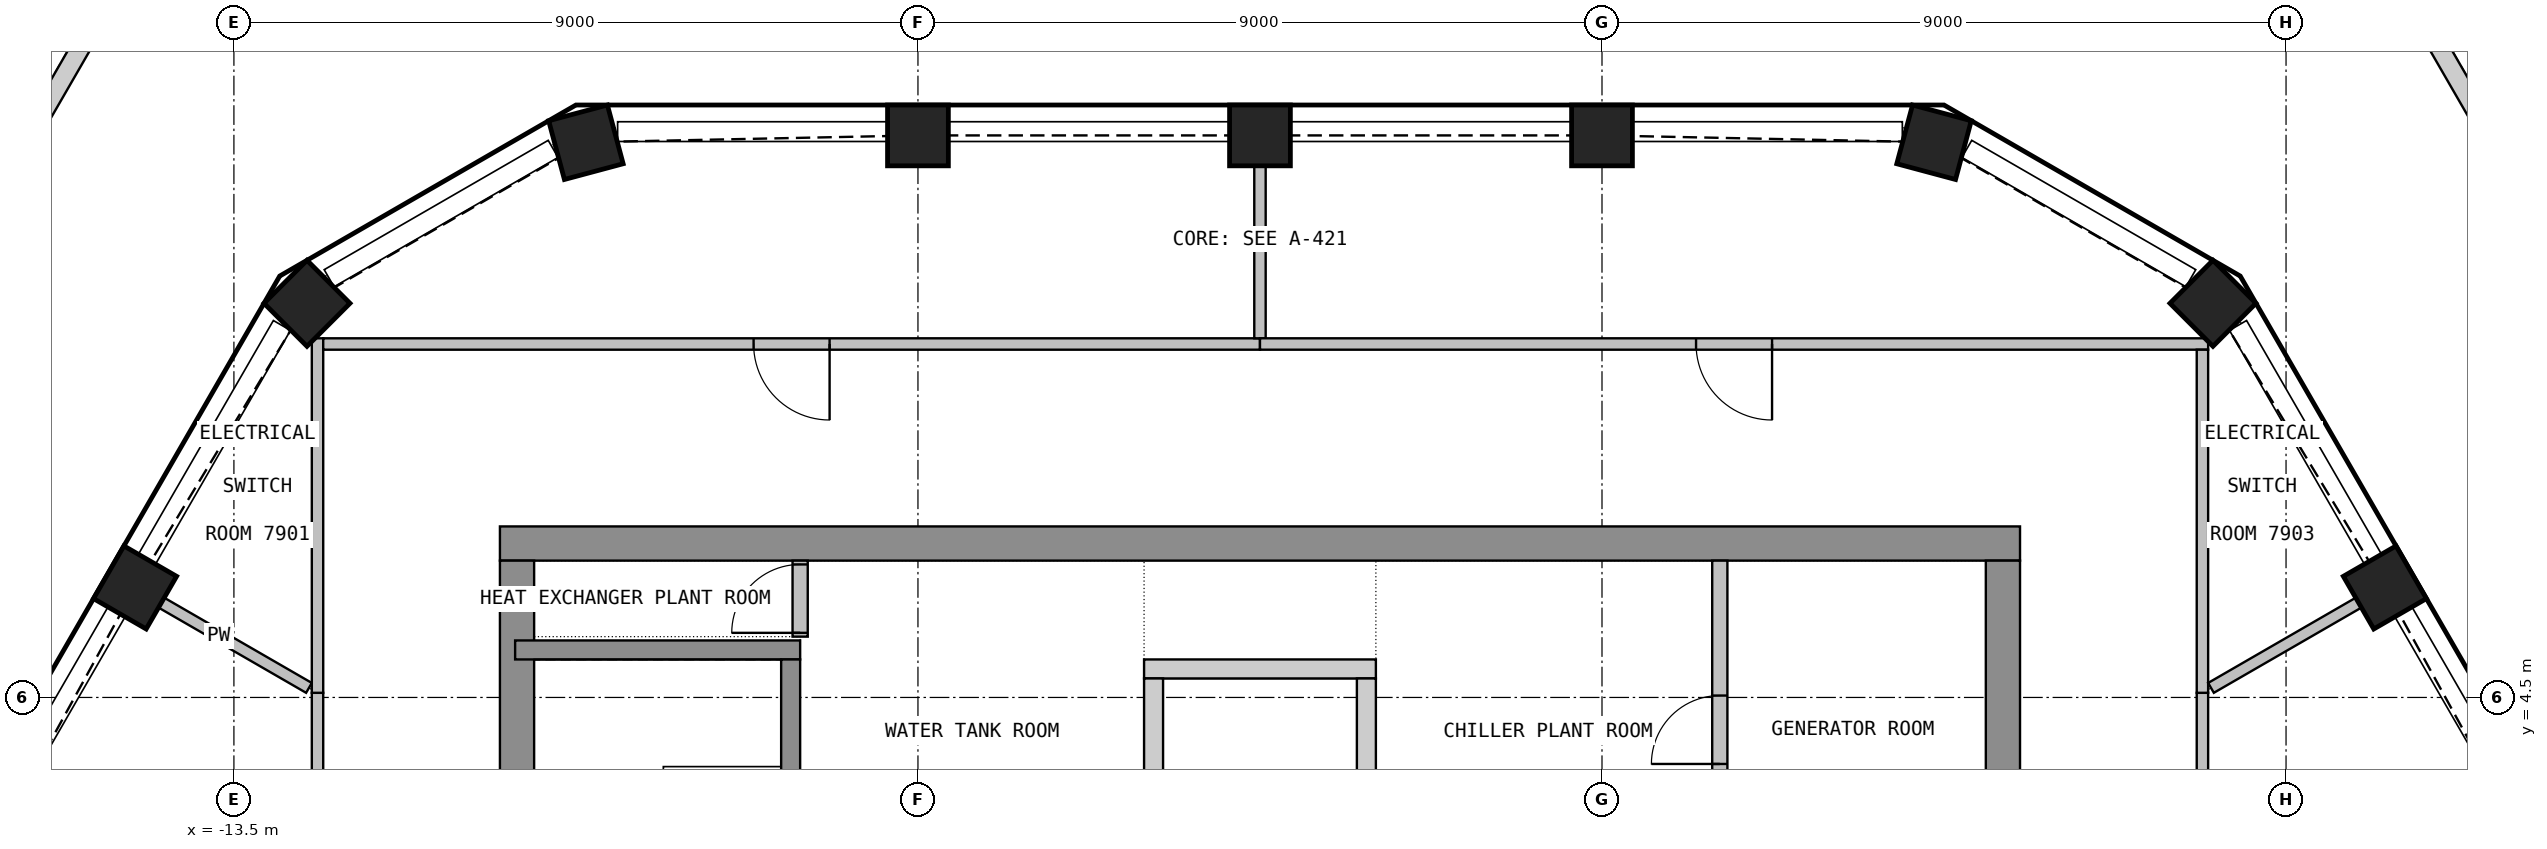
"""IFC4 building model, lengths in metres.
Left out: names, types, materials, properties, quantities, classifications, styles, units other than length and angle.
Written with IfcOpenShell. Run it as: python <this file> out.ifc"""

import sys

from ifc_helpers import new_model, si_unit, direction, frame, frame_2d, origin, origin_2d, place, context, subcontext, project, spatial, polyline, rectangle, outline, extrude, element, fill, save


model = new_model("IFC4")
c1 = context("Model", 3, precision=1e-05, world=origin(), true_north=direction((0.0, 1.0)))
c2 = subcontext(c1, "Body", "Model", "MODEL_VIEW")
j1 = project(units=[si_unit("LENGTHUNIT", "METRE"), si_unit("PLANEANGLEUNIT", "RADIAN")], contexts=[c1])
p1 = place(None, origin())
s1 = spatial("IfcSite", under=j1, at=p1, CompositionType="ELEMENT")
p2 = place(p1, origin())
s2 = spatial("IfcBuilding", under=s1, at=p2, CompositionType="ELEMENT")
p3 = place(p2, frame((0.0, 0.0, 323.4)))
s3 = spatial("IfcBuildingStorey", under=s2, at=p3, CompositionType="ELEMENT", Elevation=323.4)
for number, where, z_axis, x_axis in (
    (1, (14.801, 5.947, 0.0), (0.0, 0.0, 1.0), (-0.5, 0.866, 0.0)),
    (2, (12.539, 9.686, 0.0), (0.0, 0.0, 1.0), (-0.707, 0.707, 0.0)),
    (3, (8.869, 11.804, 0.0), (0.0, 0.0, 1.0), (-0.966, 0.259, 0.0)),
    (4, (4.5, 11.894, 0.0), (0.0, 0.0, 1.0), (-1.0, 0.0, 0.0)),
    (5, (0.0, 11.894, 0.0), (0.0, 0.0, 1.0), (-1.0, 0.0, 0.0)),
    (6, (-4.5, 11.894, 0.0), (0.0, 0.0, 1.0), (-1.0, 0.0, 0.0)),
    (7, (-8.869, 11.804, 0.0), (0.0, 0.0, 1.0), (-0.966, -0.259, 0.0)),
    (8, (-12.539, 9.686, 0.0), (0.0, 0.0, 1.0), (-0.707, -0.707, 0.0)),
    (9, (-14.801, 5.947, 0.0), (0.0, 0.0, 1.0), (-0.5, -0.866, 0.0)),
):
    element("IfcColumn", number, at=place(p3, frame(where, z_axis=z_axis, x_axis=x_axis)), inside=s3, PredefinedType="COLUMN", context=c2, shape_type="SweptSolid", body=[
        extrude(rectangle(XDim=0.8, YDim=0.8, at=origin_2d()), origin(), (0.0, 0.0, 1.0), 4.05),
    ])
p4 = place(p3, origin())
e10 = element("IfcWall", 10, at=p4, inside=s3, PredefinedType="PARAPET", context=c2, shape_type="SweptSolid", body=[
    extrude(outline(polyline([(17.397, 10.044), (15.147, 13.941), (14.964, 13.758), (17.181, 9.919), (17.397, 10.044)])), origin(), (0.0, 0.0, 1.0), 1.1),
])
p5 = place(p3, origin())
e11 = element("IfcWall", 11, at=p5, inside=s3, PredefinedType="PARAPET", context=c2, shape_type="SweptSolid", body=[
    extrude(outline(polyline([(-15.147, 13.941), (-17.397, 10.044), (-17.181, 9.919), (-14.964, 13.758), (-15.147, 13.941)])), origin(), (0.0, 0.0, 1.0), 1.1),
])
p6 = place(p3, frame((-10.0, 6.525, 0.0), z_axis=(0.0, 0.0, 1.0), x_axis=(1.0, 0.0, 0.0)))
e12 = element("IfcWall", 12, at=p6, inside=s3, PredefinedType="SHEAR", context=c2, shape_type="SweptSolid", body=[
    extrude(rectangle(XDim=20.0, YDim=0.45, at=frame_2d((10.0, 0.0))), origin(), (0.0, 0.0, 1.0), 4.05),
])
p7 = place(p3, frame((-9.775, -6.3, 0.0), z_axis=(0.0, 0.0, 1.0), x_axis=(0.0, 1.0, 0.0)))
e13 = element("IfcWall", 13, at=p7, inside=s3, PredefinedType="SHEAR", context=c2, shape_type="SweptSolid", body=[
    extrude(rectangle(XDim=12.6, YDim=0.45, at=frame_2d((6.3, 0.0))), origin(), (0.0, 0.0, 1.0), 4.05),
])
p8 = place(p7, frame((4.8, 0.0, 0.0)))
e14 = element("IfcOpeningElement", 14, at=p8, cuts=e13, PredefinedType="OPENING", context=c2, shape_type="SweptSolid", body=[
    extrude(rectangle(XDim=1.2, YDim=2.1, at=frame_2d((0.6, 1.05))), frame((0.0, 0.235, 0.0), z_axis=(0.0, -1.0, 0.0), x_axis=(1.0, 0.0, 0.0)), (0.0, 0.0, 1.0), 0.47),
])
p9 = place(p3, frame((9.775, -6.3, 0.0), z_axis=(0.0, 0.0, 1.0), x_axis=(0.0, 1.0, 0.0)))
e15 = element("IfcWall", 15, at=p9, inside=s3, PredefinedType="SHEAR", context=c2, shape_type="SweptSolid", body=[
    extrude(rectangle(XDim=12.6, YDim=0.45, at=frame_2d((6.3, 0.0))), origin(), (0.0, 0.0, 1.0), 4.05),
])
p10 = place(p9, frame((6.6, 0.0, 0.0)))
e16 = element("IfcOpeningElement", 16, at=p10, cuts=e15, PredefinedType="OPENING", context=c2, shape_type="SweptSolid", body=[
    extrude(rectangle(XDim=1.2, YDim=2.1, at=frame_2d((0.6, 1.05))), frame((0.0, 0.235, 0.0), z_axis=(0.0, -1.0, 0.0), x_axis=(1.0, 0.0, 0.0)), (0.0, 0.0, 1.0), 0.47),
])
p11 = place(p3, origin())
e17 = element("IfcWall", 17, at=p11, inside=s3, PredefinedType="SHEAR", context=c2, shape_type="SweptSolid", body=[
    extrude(outline(polyline([(-1.525, 4.75), (1.525, 4.75), (1.525, 5.0), (-1.525, 5.0), (-1.525, 4.75)])), origin(), (0.0, 0.0, 1.0), 4.05),
])
p12 = place(p3, origin())
e18 = element("IfcWall", 18, at=p12, inside=s3, PredefinedType="SHEAR", context=c2, shape_type="SweptSolid", body=[
    extrude(outline(polyline([(-1.525, 2.05), (-1.275, 2.05), (-1.275, 4.75), (-1.525, 4.75), (-1.525, 2.05)])), origin(), (0.0, 0.0, 1.0), 4.05),
])
p13 = place(p3, origin())
e19 = element("IfcWall", 19, at=p13, inside=s3, PredefinedType="SHEAR", context=c2, shape_type="SweptSolid", body=[
    extrude(outline(polyline([(1.275, 2.05), (1.525, 2.05), (1.525, 4.75), (1.275, 4.75), (1.275, 2.05)])), origin(), (0.0, 0.0, 1.0), 4.05),
])
p14 = place(p3, frame((-9.8, 5.125, 0.0), z_axis=(0.0, 0.0, 1.0), x_axis=(1.0, 0.0, 0.0)))
e20 = element("IfcWall", 20, at=p14, inside=s3, PredefinedType="SHEAR", context=c2, shape_type="SweptSolid", body=[
    extrude(rectangle(XDim=3.75, YDim=0.25, at=frame_2d((1.875, 0.0))), origin(), (0.0, 0.0, 1.0), 4.05),
])
p15 = place(p3, frame((-6.175, -1.6, 0.0), z_axis=(0.0, 0.0, 1.0), x_axis=(0.0, 1.0, 0.0)))
e21 = element("IfcWall", 21, at=p15, inside=s3, PredefinedType="SHEAR", context=c2, shape_type="SweptSolid", body=[
    extrude(rectangle(XDim=6.6, YDim=0.25, at=frame_2d((3.3, 0.0))), origin(), (0.0, 0.0, 1.0), 4.05),
])
p16 = place(p15, frame((0.2, 0.0, 0.0)))
e22 = element("IfcOpeningElement", 22, at=p16, cuts=e21, PredefinedType="OPENING", context=c2, shape_type="SweptSolid", body=[
    extrude(rectangle(XDim=1.2, YDim=2.1, at=frame_2d((0.6, 1.05))), frame((0.0, 0.135, 0.0), z_axis=(0.0, -1.0, 0.0), x_axis=(1.0, 0.0, 0.0)), (0.0, 0.0, 1.0), 0.27),
])
p17 = place(p3, frame((-6.05, 5.3, 0.0), z_axis=(0.0, 0.0, 1.0), x_axis=(0.0, 1.0, 0.0)))
e23 = element("IfcWall", 23, at=p17, inside=s3, PredefinedType="PARTITIONING", context=c2, shape_type="SweptSolid", body=[
    extrude(rectangle(XDim=1.0, YDim=0.2, at=frame_2d((0.5, 0.0))), origin(), (0.0, 0.0, 1.0), 4.05),
])
p18 = place(p17, frame((0.05, 0.0, 0.0)))
e24 = element("IfcOpeningElement", 24, at=p18, cuts=e23, PredefinedType="OPENING", context=c2, shape_type="SweptSolid", body=[
    extrude(rectangle(XDim=0.9, YDim=2.1, at=frame_2d((0.45, 1.05))), frame((0.0, 0.11, 0.0), z_axis=(0.0, -1.0, 0.0), x_axis=(1.0, 0.0, 0.0)), (0.0, 0.0, 1.0), 0.22),
])
p19 = place(p3, frame((6.05, 1.85, 0.0), z_axis=(0.0, 0.0, 1.0), x_axis=(0.0, 1.0, 0.0)))
e25 = element("IfcWall", 25, at=p19, inside=s3, PredefinedType="PARTITIONING", context=c2, shape_type="SweptSolid", body=[
    extrude(rectangle(XDim=4.45, YDim=0.2, at=frame_2d((2.225, 0.0))), origin(), (0.0, 0.0, 1.0), 4.05),
])
p20 = place(p19, frame((1.775, 0.0, 0.0)))
e26 = element("IfcOpeningElement", 26, at=p20, cuts=e25, PredefinedType="OPENING", context=c2, shape_type="SweptSolid", body=[
    extrude(rectangle(XDim=0.9, YDim=2.1, at=frame_2d((0.45, 1.05))), frame((0.0, 0.11, 0.0), z_axis=(0.0, -1.0, 0.0), x_axis=(1.0, 0.0, 0.0)), (0.0, 0.0, 1.0), 0.22),
])
p21 = place(p3, frame((-14.887, 5.997, 0.0), z_axis=(0.0, 0.0, 1.0), x_axis=(0.865976483427, -0.500084722974, 0.0)))
e27 = element("IfcWall", 27, at=p21, inside=s3, PredefinedType="PARTITIONING", context=c2, shape_type="SweptSolid", body=[
    extrude(rectangle(XDim=2.742, YDim=0.15, at=frame_2d((1.371, 0.0))), origin(), (0.0, 0.0, 1.0), 4.05),
])
p22 = place(p3, frame((-12.4, 4.561, 0.0), z_axis=(0.0, 0.0, 1.0), x_axis=(0.0, -1.0, 0.0)))
e28 = element("IfcWall", 28, at=p22, inside=s3, PredefinedType="PARTITIONING", context=c2, shape_type="SweptSolid", body=[
    extrude(rectangle(XDim=13.786, YDim=0.15, at=frame_2d((6.893, 0.0))), origin(), (0.0, 0.0, 1.0), 4.05),
])
p23 = place(p22, frame((6.393, 0.0, 0.0)))
e29 = element("IfcOpeningElement", 29, at=p23, cuts=e28, PredefinedType="OPENING", context=c2, shape_type="SweptSolid", body=[
    extrude(rectangle(XDim=1.0, YDim=2.1, at=frame_2d((0.5, 1.05))), frame((0.0, 0.085, 0.0), z_axis=(0.0, -1.0, 0.0), x_axis=(1.0, 0.0, 0.0)), (0.0, 0.0, 1.0), 0.17),
])
p24 = place(p3, frame((-12.4, 9.225, 0.0), z_axis=(0.0, 0.0, 1.0), x_axis=(0.0, -1.0, 0.0)))
e30 = element("IfcWall", 30, at=p24, inside=s3, PredefinedType="PARTITIONING", context=c2, shape_type="SweptSolid", body=[
    extrude(rectangle(XDim=4.664, YDim=0.15, at=frame_2d((2.332, 0.0))), origin(), (0.0, 0.0, 1.0), 4.05),
])
p25 = place(p3, frame((0.0, 9.15, 0.0), z_axis=(0.0, 0.0, 1.0), x_axis=(-1.0, 0.0, 0.0)))
e31 = element("IfcWall", 31, at=p25, inside=s3, PredefinedType="PARTITIONING", context=c2, shape_type="SweptSolid", body=[
    extrude(rectangle(XDim=12.325, YDim=0.15, at=frame_2d((6.163, 0.0))), origin(), (0.0, 0.0, 1.0), 4.05),
])
p26 = place(p25, frame((5.663, 0.0, 0.0)))
e32 = element("IfcOpeningElement", 32, at=p26, cuts=e31, PredefinedType="OPENING", context=c2, shape_type="SweptSolid", body=[
    extrude(rectangle(XDim=1.0, YDim=2.1, at=frame_2d((0.5, 1.05))), frame((0.0, 0.085, 0.0), z_axis=(0.0, -1.0, 0.0), x_axis=(1.0, 0.0, 0.0)), (0.0, 0.0, 1.0), 0.17),
])
p27 = place(p3, frame((0.0, 11.994, 0.0), z_axis=(0.0, 0.0, 1.0), x_axis=(0.0, -1.0, 0.0)))
e33 = element("IfcWall", 33, at=p27, inside=s3, PredefinedType="PARTITIONING", context=c2, shape_type="SweptSolid", body=[
    extrude(rectangle(XDim=2.769, YDim=0.15, at=frame_2d((1.384, 0.0))), origin(), (0.0, 0.0, 1.0), 4.05),
])
p28 = place(p3, frame((12.475, 9.15, 0.0), z_axis=(0.0, 0.0, 1.0), x_axis=(-1.0, 0.0, 0.0)))
e34 = element("IfcWall", 34, at=p28, inside=s3, PredefinedType="PARTITIONING", context=c2, shape_type="SweptSolid", body=[
    extrude(rectangle(XDim=12.475, YDim=0.15, at=frame_2d((6.238, 0.0))), origin(), (0.0, 0.0, 1.0), 4.05),
])
p29 = place(p28, frame((5.738, 0.0, 0.0)))
e35 = element("IfcOpeningElement", 35, at=p29, cuts=e34, PredefinedType="OPENING", context=c2, shape_type="SweptSolid", body=[
    extrude(rectangle(XDim=1.0, YDim=2.1, at=frame_2d((0.5, 1.05))), frame((0.0, 0.085, 0.0), z_axis=(0.0, -1.0, 0.0), x_axis=(1.0, 0.0, 0.0)), (0.0, 0.0, 1.0), 0.17),
])
p30 = place(p3, frame((12.4, -9.075, 0.0), z_axis=(0.0, 0.0, 1.0), x_axis=(0.0, 1.0, 0.0)))
e36 = element("IfcWall", 36, at=p30, inside=s3, PredefinedType="PARTITIONING", context=c2, shape_type="SweptSolid", body=[
    extrude(rectangle(XDim=13.636, YDim=0.15, at=frame_2d((6.818, 0.0))), origin(), (0.0, 0.0, 1.0), 4.05),
])
p31 = place(p30, frame((6.318, 0.0, 0.0)))
e37 = element("IfcOpeningElement", 37, at=p31, cuts=e36, PredefinedType="OPENING", context=c2, shape_type="SweptSolid", body=[
    extrude(rectangle(XDim=1.0, YDim=2.1, at=frame_2d((0.5, 1.05))), frame((0.0, 0.085, 0.0), z_axis=(0.0, -1.0, 0.0), x_axis=(1.0, 0.0, 0.0)), (0.0, 0.0, 1.0), 0.17),
])
p32 = place(p3, frame((12.4, 4.561, 0.0), z_axis=(0.0, 0.0, 1.0), x_axis=(0.0, 1.0, 0.0)))
e38 = element("IfcWall", 38, at=p32, inside=s3, PredefinedType="PARTITIONING", context=c2, shape_type="SweptSolid", body=[
    extrude(rectangle(XDim=4.514, YDim=0.15, at=frame_2d((2.257, 0.0))), origin(), (0.0, 0.0, 1.0), 4.05),
])
p33 = place(p3, frame((14.887, 5.997, 0.0), z_axis=(0.0, 0.0, 1.0), x_axis=(-0.865976483427, -0.500084722974, 0.0)))
e39 = element("IfcWall", 39, at=p33, inside=s3, PredefinedType="PARTITIONING", context=c2, shape_type="SweptSolid", body=[
    extrude(rectangle(XDim=2.742, YDim=0.15, at=frame_2d((1.371, 0.0))), origin(), (0.0, 0.0, 1.0), 4.05),
])
p34 = place(p18, origin())
e40 = element("IfcDoor", 40, at=p34, inside=s3, OperationType="SINGLE_SWING_LEFT", PredefinedType="DOOR", context=c2, shape_type="SweptSolid", body=[
    extrude(rectangle(XDim=0.9, YDim=2.1, at=frame_2d((0.45, 1.05))), frame((0.0, 0.025, 0.0), z_axis=(0.0, -1.0, 0.0), x_axis=(1.0, 0.0, 0.0)), (0.0, 0.0, 1.0), 0.05),
])
fill(e24, e40)
p35 = place(p20, origin())
e41 = element("IfcDoor", 41, at=p35, inside=s3, OperationType="SINGLE_SWING_LEFT", PredefinedType="DOOR", context=c2, shape_type="SweptSolid", body=[
    extrude(rectangle(XDim=0.9, YDim=2.1, at=frame_2d((0.45, 1.05))), frame((0.0, 0.025, 0.0), z_axis=(0.0, -1.0, 0.0), x_axis=(1.0, 0.0, 0.0)), (0.0, 0.0, 1.0), 0.05),
])
fill(e26, e41)
p36 = place(p26, origin())
e42 = element("IfcDoor", 42, at=p36, inside=s3, OperationType="SINGLE_SWING_RIGHT", PredefinedType="DOOR", context=c2, shape_type="SweptSolid", body=[
    extrude(rectangle(XDim=1.0, YDim=2.1, at=frame_2d((0.5, 1.05))), frame((0.0, 0.025, 0.0), z_axis=(0.0, -1.0, 0.0), x_axis=(1.0, 0.0, 0.0)), (0.0, 0.0, 1.0), 0.05),
])
fill(e32, e42)
p37 = place(p29, origin())
e43 = element("IfcDoor", 43, at=p37, inside=s3, OperationType="SINGLE_SWING_RIGHT", PredefinedType="DOOR", context=c2, shape_type="SweptSolid", body=[
    extrude(rectangle(XDim=1.0, YDim=2.1, at=frame_2d((0.5, 1.05))), frame((0.0, 0.025, 0.0), z_axis=(0.0, -1.0, 0.0), x_axis=(1.0, 0.0, 0.0)), (0.0, 0.0, 1.0), 0.05),
])
fill(e35, e43)
save(model, sys.argv[1])
